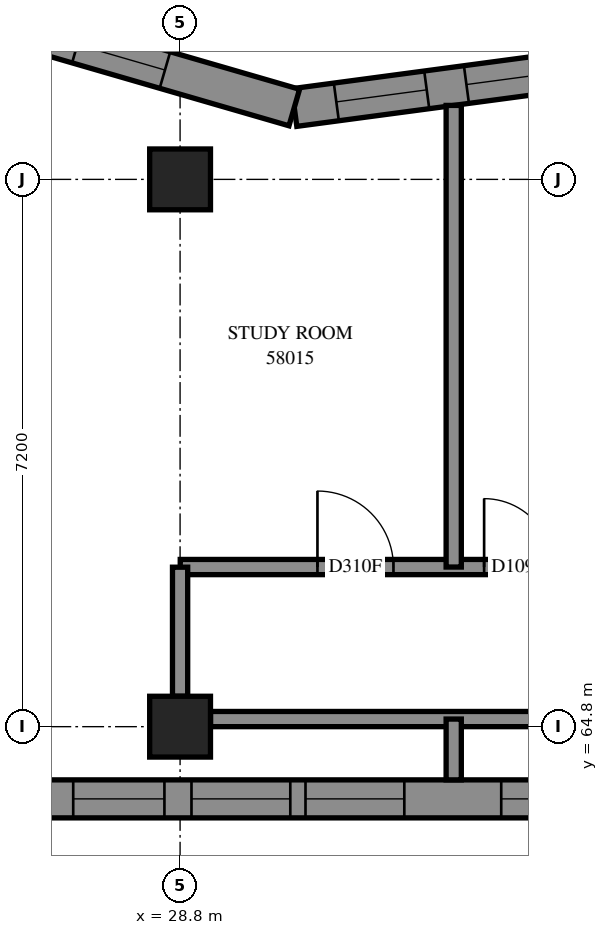
"""IFC4 building model, lengths in metres.
Left out: names, types, materials, properties, quantities, classifications, styles, units other than length and angle.
Written with IfcOpenShell. Run it as: python <this file> out.ifc"""

import sys

from ifc_helpers import new_model, si_unit, direction, frame, frame_2d, origin, origin_2d, place, context, subcontext, project, spatial, polyline, rectangle, outline, extrude, element, fill, save


model = new_model("IFC4")
c1 = context("Model", 3, precision=1e-05, world=origin(), true_north=direction((0.0, 1.0)))
c2 = subcontext(c1, "Body", "Model", "MODEL_VIEW")
j1 = project(units=[si_unit("LENGTHUNIT", "METRE"), si_unit("PLANEANGLEUNIT", "RADIAN")], contexts=[c1])
p1 = place(None, origin())
s1 = spatial("IfcSite", under=j1, at=p1, CompositionType="ELEMENT")
p2 = place(p1, origin())
s2 = spatial("IfcBuilding", under=s1, at=p2, CompositionType="ELEMENT")
p3 = place(p2, frame((0.0, 0.0, 213.4)))
s3 = spatial("IfcBuildingStorey", under=s2, at=p3, CompositionType="ELEMENT", Elevation=213.4)
for number, where, z_axis, x_axis in (
    (1, (28.8, 64.8, 0.0), (0.0, 0.0, 1.0), (1.0, 0.0, 0.0)),
    (2, (28.8, 72.0, 0.0), (0.0, 0.0, 1.0), (1.0, 0.0, 0.0)),
):
    element("IfcColumn", number, at=place(p3, frame(where, z_axis=z_axis, x_axis=x_axis)), inside=s3, PredefinedType="COLUMN", context=c2, shape_type="SweptSolid", body=[
        extrude(rectangle(XDim=0.8, YDim=0.8, at=origin_2d()), origin(), (0.0, 0.0, 1.0), 3.1),
    ])
p4 = place(p3, frame((34.155, 73.46, 0.0), z_axis=(0.0, 0.0, 1.0), x_axis=(-0.991196865, -0.1323962796, 0.0)))
e3 = element("IfcWall", 3, at=p4, inside=s3, PredefinedType="SOLIDWALL", context=c2, shape_type="SweptSolid", body=[
    extrude(outline(polyline([(-0.033, -0.25), (3.834, -0.25), (3.939, 0.25), (0.033, 0.25), (-0.033, -0.25)])), origin(), (0.0, 0.0, 1.0), 3.1),
])
p5 = place(p4, frame((0.402, 0.0, 0.45)))
e4 = element("IfcOpeningElement", 4, at=p5, cuts=e3, PredefinedType="OPENING", context=c2, shape_type="SweptSolid", body=[
    extrude(rectangle(XDim=1.2, YDim=2.5, at=frame_2d((0.6, 1.25))), frame((0.0, 0.26, 0.0), z_axis=(0.0, -1.0, 0.0), x_axis=(1.0, 0.0, 0.0)), (0.0, 0.0, 1.0), 0.52),
])
p6 = place(p4, frame((2.129, 0.0, 0.45)))
e5 = element("IfcOpeningElement", 5, at=p6, cuts=e3, PredefinedType="OPENING", context=c2, shape_type="SweptSolid", body=[
    extrude(rectangle(XDim=1.2, YDim=2.5, at=frame_2d((0.6, 1.25))), frame((0.0, 0.26, 0.0), z_axis=(0.0, -1.0, 0.0), x_axis=(1.0, 0.0, 0.0)), (0.0, 0.0, 1.0), 0.52),
])
p7 = place(p3, frame((30.302, 72.945, 0.0), z_axis=(0.0, 0.0, 1.0), x_axis=(-0.9604078738, 0.2785977673, 0.0)))
e6 = element("IfcWall", 6, at=p7, inside=s3, PredefinedType="SOLIDWALL", context=c2, shape_type="SweptSolid", body=[
    extrude(outline(polyline([(0.053, -0.25), (4.044, -0.25), (3.379, 0.25), (-0.053, 0.25), (0.053, -0.25)])), origin(), (0.0, 0.0, 1.0), 3.1),
])
p8 = place(p7, frame((1.772, 0.0, 0.45)))
e7 = element("IfcOpeningElement", 7, at=p8, cuts=e6, PredefinedType="OPENING", context=c2, shape_type="SweptSolid", body=[
    extrude(rectangle(XDim=1.2, YDim=2.5, at=frame_2d((0.6, 1.25))), frame((0.0, 0.26, 0.0), z_axis=(0.0, -1.0, 0.0), x_axis=(1.0, 0.0, 0.0)), (0.0, 0.0, 1.0), 0.52),
])
p9 = place(p3, frame((26.738, 63.85, 0.0), z_axis=(0.0, 0.0, 1.0), x_axis=(1.0, 0.0, 0.0)))
e8 = element("IfcWall", 8, at=p9, inside=s3, PredefinedType="SOLIDWALL", context=c2, shape_type="SweptSolid", body=[
    extrude(outline(polyline([(-0.25, -0.25), (8.062, -0.25), (8.562, 0.25), (0.25, 0.25), (-0.25, -0.25)])), origin(), (0.0, 0.0, 1.0), 3.1),
])
p10 = place(p9, frame((2.212, 0.0, 0.45)))
e9 = element("IfcOpeningElement", 9, at=p10, cuts=e8, PredefinedType="OPENING", context=c2, shape_type="SweptSolid", body=[
    extrude(rectangle(XDim=1.3, YDim=2.5, at=frame_2d((0.65, 1.25))), frame((0.0, 0.26, 0.0), z_axis=(0.0, -1.0, 0.0), x_axis=(1.0, 0.0, 0.0)), (0.0, 0.0, 1.0), 0.52),
])
p11 = place(p9, frame((3.712, 0.0, 0.45)))
e10 = element("IfcOpeningElement", 10, at=p11, cuts=e8, PredefinedType="OPENING", context=c2, shape_type="SweptSolid", body=[
    extrude(rectangle(XDim=1.3, YDim=2.5, at=frame_2d((0.65, 1.25))), frame((0.0, 0.26, 0.0), z_axis=(0.0, -1.0, 0.0), x_axis=(1.0, 0.0, 0.0)), (0.0, 0.0, 1.0), 0.52),
])
p12 = place(p9, frame((0.656, 0.0, 0.45)))
e11 = element("IfcOpeningElement", 11, at=p12, cuts=e8, PredefinedType="OPENING", context=c2, shape_type="SweptSolid", body=[
    extrude(rectangle(XDim=1.2, YDim=2.5, at=frame_2d((0.6, 1.25))), frame((0.0, 0.26, 0.0), z_axis=(0.0, -1.0, 0.0), x_axis=(1.0, 0.0, 0.0)), (0.0, 0.0, 1.0), 0.52),
])
p13 = place(p9, frame((6.287, 0.0, 0.45)))
e12 = element("IfcOpeningElement", 12, at=p13, cuts=e8, PredefinedType="OPENING", context=c2, shape_type="SweptSolid", body=[
    extrude(rectangle(XDim=1.2, YDim=2.5, at=frame_2d((0.6, 1.25))), frame((0.0, 0.26, 0.0), z_axis=(0.0, -1.0, 0.0), x_axis=(1.0, 0.0, 0.0)), (0.0, 0.0, 1.0), 0.52),
])
p14 = place(p3, frame((28.802, 66.9, 0.0), z_axis=(0.0, 0.0, 1.0), x_axis=(1.0, 0.0, 0.0)))
e13 = element("IfcWall", 13, at=p14, inside=s3, PredefinedType="PARTITIONING", context=c2, shape_type="SweptSolid", body=[
    extrude(rectangle(XDim=11.798, YDim=0.2, at=frame_2d((5.899, 0.0))), origin(), (0.0, 0.0, 1.0), 3.1),
])
p15 = place(p14, frame((1.805, 0.0, 0.0)))
e14 = element("IfcOpeningElement", 14, at=p15, cuts=e13, PredefinedType="OPENING", context=c2, shape_type="SweptSolid", body=[
    extrude(rectangle(XDim=1.0, YDim=2.1, at=frame_2d((0.5, 1.05))), frame((0.0, 0.11, 0.0), z_axis=(0.0, -1.0, 0.0), x_axis=(1.0, 0.0, 0.0)), (0.0, 0.0, 1.0), 0.22),
])
p16 = place(p14, frame((3.998, 0.0, 0.0)))
e15 = element("IfcOpeningElement", 15, at=p16, cuts=e13, PredefinedType="OPENING", context=c2, shape_type="SweptSolid", body=[
    extrude(rectangle(XDim=0.9, YDim=2.1, at=frame_2d((0.45, 1.05))), frame((0.0, 0.11, 0.0), z_axis=(0.0, -1.0, 0.0), x_axis=(1.0, 0.0, 0.0)), (0.0, 0.0, 1.0), 0.22),
])
p17 = place(p14, frame((9.448, 0.0, 0.0)))
e16 = element("IfcOpeningElement", 16, at=p17, cuts=e13, PredefinedType="OPENING", context=c2, shape_type="SweptSolid", body=[
    extrude(rectangle(XDim=0.9, YDim=2.1, at=frame_2d((0.45, 1.05))), frame((0.0, 0.11, 0.0), z_axis=(0.0, -1.0, 0.0), x_axis=(1.0, 0.0, 0.0)), (0.0, 0.0, 1.0), 0.22),
])
p18 = place(p3, frame((29.2, 64.9, 0.0), z_axis=(0.0, 0.0, 1.0), x_axis=(1.0, 0.0, 0.0)))
e17 = element("IfcWall", 17, at=p18, inside=s3, PredefinedType="PARTITIONING", context=c2, shape_type="SweptSolid", body=[
    extrude(rectangle(XDim=6.4, YDim=0.2, at=frame_2d((3.2, 0.0))), origin(), (0.0, 0.0, 1.0), 2.6),
])
p19 = place(p3, frame((32.4, 66.9, 0.0), z_axis=(0.0, 0.0, 1.0), x_axis=(0.0, 1.0, 0.0)))
e18 = element("IfcWall", 18, at=p19, inside=s3, PredefinedType="PARTITIONING", context=c2, shape_type="SweptSolid", body=[
    extrude(rectangle(XDim=6.073, YDim=0.2, at=frame_2d((3.037, 0.0))), origin(), (0.0, 0.0, 1.0), 3.1),
])
p20 = place(p3, frame((28.8, 65.2, 0.0), z_axis=(0.0, 0.0, 1.0), x_axis=(0.0, 1.0, 0.0)))
e19 = element("IfcWall", 19, at=p20, inside=s3, PredefinedType="PARTITIONING", context=c2, shape_type="SweptSolid", body=[
    extrude(rectangle(XDim=1.698, YDim=0.2, at=frame_2d((0.849, 0.0))), origin(), (0.0, 0.0, 1.0), 2.6),
])
p21 = place(p3, frame((32.4, 64.1, 0.0), z_axis=(0.0, 0.0, 1.0), x_axis=(0.0, 1.0, 0.0)))
e20 = element("IfcWall", 20, at=p21, inside=s3, PredefinedType="PARTITIONING", context=c2, shape_type="SweptSolid", body=[
    extrude(rectangle(XDim=0.8, YDim=0.2, at=frame_2d((0.4, 0.0))), origin(), (0.0, 0.0, 1.0), 3.1),
])
p22 = place(p5, origin())
e21 = element("IfcWindow", 21, at=p22, inside=s3, PartitioningType="SINGLE_PANEL", PredefinedType="WINDOW", context=c2, shape_type="SweptSolid", body=[
    extrude(rectangle(XDim=1.2, YDim=2.5, at=frame_2d((0.6, 1.25))), frame((0.0, 0.18, 0.0), z_axis=(0.0, -1.0, 0.0), x_axis=(1.0, 0.0, 0.0)), (0.0, 0.0, 1.0), 0.06),
])
fill(e4, e21)
p23 = place(p6, origin())
e22 = element("IfcWindow", 22, at=p23, inside=s3, PartitioningType="SINGLE_PANEL", PredefinedType="WINDOW", context=c2, shape_type="SweptSolid", body=[
    extrude(rectangle(XDim=1.2, YDim=2.5, at=frame_2d((0.6, 1.25))), frame((0.0, 0.18, 0.0), z_axis=(0.0, -1.0, 0.0), x_axis=(1.0, 0.0, 0.0)), (0.0, 0.0, 1.0), 0.06),
])
fill(e5, e22)
p24 = place(p8, origin())
e23 = element("IfcWindow", 23, at=p24, inside=s3, PartitioningType="SINGLE_PANEL", PredefinedType="WINDOW", context=c2, shape_type="SweptSolid", body=[
    extrude(rectangle(XDim=1.2, YDim=2.5, at=frame_2d((0.6, 1.25))), frame((0.0, 0.18, 0.0), z_axis=(0.0, -1.0, 0.0), x_axis=(1.0, 0.0, 0.0)), (0.0, 0.0, 1.0), 0.06),
])
fill(e7, e23)
p25 = place(p10, origin())
e24 = element("IfcWindow", 24, at=p25, inside=s3, PartitioningType="SINGLE_PANEL", PredefinedType="WINDOW", context=c2, shape_type="SweptSolid", body=[
    extrude(rectangle(XDim=1.3, YDim=2.5, at=frame_2d((0.65, 1.25))), frame((0.0, 0.18, 0.0), z_axis=(0.0, -1.0, 0.0), x_axis=(1.0, 0.0, 0.0)), (0.0, 0.0, 1.0), 0.06),
])
fill(e9, e24)
p26 = place(p11, origin())
e25 = element("IfcWindow", 25, at=p26, inside=s3, PartitioningType="SINGLE_PANEL", PredefinedType="WINDOW", context=c2, shape_type="SweptSolid", body=[
    extrude(rectangle(XDim=1.3, YDim=2.5, at=frame_2d((0.65, 1.25))), frame((0.0, 0.18, 0.0), z_axis=(0.0, -1.0, 0.0), x_axis=(1.0, 0.0, 0.0)), (0.0, 0.0, 1.0), 0.06),
])
fill(e10, e25)
p27 = place(p12, origin())
e26 = element("IfcWindow", 26, at=p27, inside=s3, PartitioningType="SINGLE_PANEL", PredefinedType="WINDOW", context=c2, shape_type="SweptSolid", body=[
    extrude(rectangle(XDim=1.2, YDim=2.5, at=frame_2d((0.6, 1.25))), frame((0.0, 0.18, 0.0), z_axis=(0.0, -1.0, 0.0), x_axis=(1.0, 0.0, 0.0)), (0.0, 0.0, 1.0), 0.06),
])
fill(e11, e26)
p28 = place(p13, origin())
e27 = element("IfcWindow", 27, at=p28, inside=s3, PartitioningType="SINGLE_PANEL", PredefinedType="WINDOW", context=c2, shape_type="SweptSolid", body=[
    extrude(rectangle(XDim=1.2, YDim=2.5, at=frame_2d((0.6, 1.25))), frame((0.0, 0.18, 0.0), z_axis=(0.0, -1.0, 0.0), x_axis=(1.0, 0.0, 0.0)), (0.0, 0.0, 1.0), 0.06),
])
fill(e12, e27)
p29 = place(p15, origin())
e28 = element("IfcDoor", 28, at=p29, inside=s3, OperationType="SINGLE_SWING_RIGHT", PredefinedType="DOOR", context=c2, shape_type="SweptSolid", body=[
    extrude(rectangle(XDim=1.0, YDim=2.1, at=frame_2d((0.5, 1.05))), frame((0.0, 0.025, 0.0), z_axis=(0.0, -1.0, 0.0), x_axis=(1.0, 0.0, 0.0)), (0.0, 0.0, 1.0), 0.05),
])
fill(e14, e28)
p30 = place(p16, origin())
e29 = element("IfcDoor", 29, at=p30, inside=s3, OperationType="SINGLE_SWING_LEFT", PredefinedType="DOOR", context=c2, shape_type="SweptSolid", body=[
    extrude(rectangle(XDim=0.9, YDim=2.1, at=frame_2d((0.45, 1.05))), frame((0.0, 0.025, 0.0), z_axis=(0.0, -1.0, 0.0), x_axis=(1.0, 0.0, 0.0)), (0.0, 0.0, 1.0), 0.05),
])
fill(e15, e29)
save(model, sys.argv[1])
